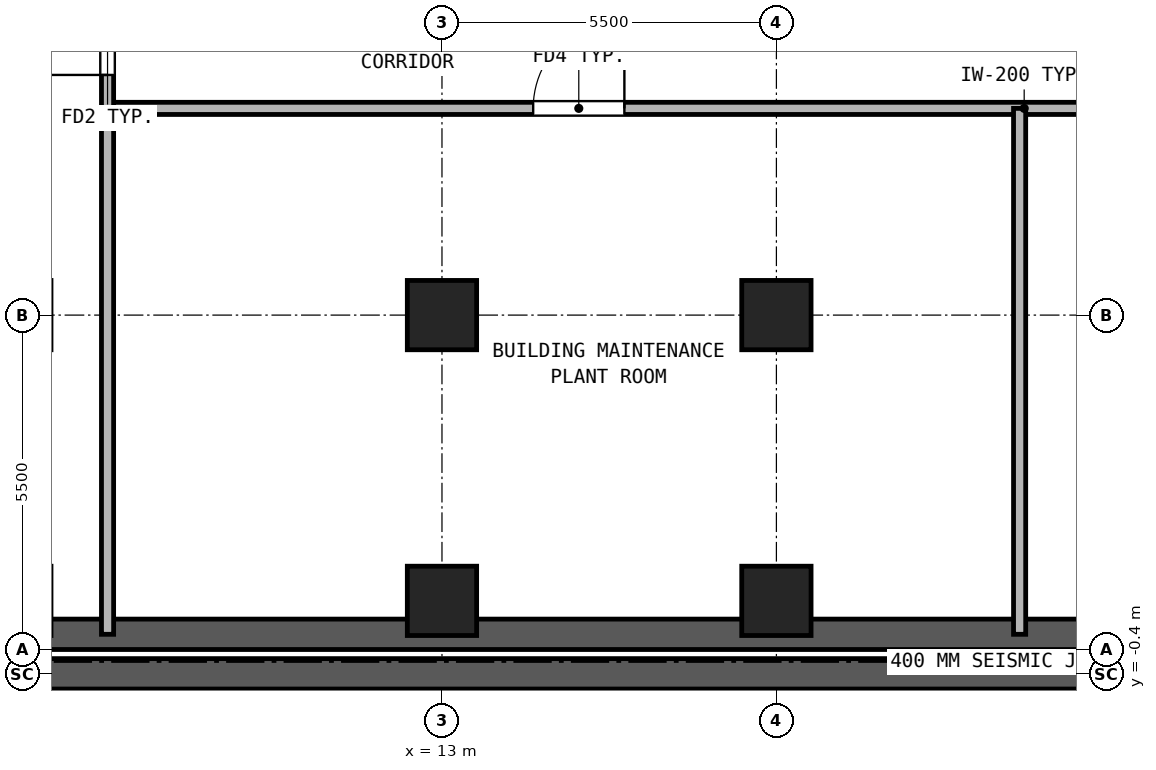
"""IFC4 building model, lengths in metres.
Left out: names, types, materials, properties, quantities, classifications, styles, units other than length and angle.
Written with IfcOpenShell. Run it as: python <this file> out.ifc"""

import sys

from ifc_helpers import new_model, si_unit, direction, frame, frame_2d, origin, origin_2d, place, context, subcontext, project, spatial, rectangle, hollow_rectangle, extrude, source, transform, mapped, element, fill, save


model = new_model("IFC4")
c1 = context("Model", 3, precision=1e-05, world=origin(), true_north=direction((0.0, 1.0)))
c2 = subcontext(c1, "Body", "Model", "MODEL_VIEW")
j1 = project(units=[si_unit("LENGTHUNIT", "METRE"), si_unit("PLANEANGLEUNIT", "RADIAN")], contexts=[c1])
p1 = place(None, origin())
s1 = spatial("IfcSite", under=j1, at=p1, CompositionType="ELEMENT")
p2 = place(p1, origin())
s2 = spatial("IfcBuilding", under=s1, at=p2, CompositionType="ELEMENT")
p3 = place(p2, frame((0.0, 0.0, -4.2)))
s3 = spatial("IfcBuildingStorey", under=s2, at=p3, CompositionType="ELEMENT", Elevation=-4.2)
m1 = source(origin(), c2, "Body", "SweptSolid", [
    extrude(hollow_rectangle(XDim=1.14, YDim=1.14, WallThickness=0.07, at=origin_2d()), origin(), (0.0, 0.0, 1.0), 3.88),
])
for number, where, z_axis, x_axis in (
    (1, (13.0, 0.8, 0.0), (0.0, 0.0, 1.0), (1.0, 0.0, 0.0)),
    (2, (18.5, 0.8, 0.0), (0.0, 0.0, 1.0), (1.0, 0.0, 0.0)),
    (3, (13.0, 5.5, 0.0), (0.0, 0.0, 1.0), (1.0, 0.0, 0.0)),
    (4, (18.5, 5.5, 0.0), (0.0, 0.0, 1.0), (1.0, 0.0, 0.0)),
):
    element("IfcColumn", number, at=place(p3, frame(where, z_axis=z_axis, x_axis=x_axis)), inside=s3, PredefinedType="COLUMN", context=c2, shape_type="MappedRepresentation", body=[
        mapped(m1, transform((0.0, 0.0, 0.0), x_axis=(1.0, 0.0, 0.0), y_axis=(0.0, 1.0, 0.0), z_axis=(0.0, 0.0, 1.0), scale=1.0)),
    ])
p4 = place(p3, frame((4.0, 0.25, 0.0), z_axis=(0.0, 0.0, 1.0), x_axis=(1.0, 0.0, 0.0)))
e5 = element("IfcWall", 5, at=p4, inside=s3, PredefinedType="USERDEFINED", context=c2, shape_type="SweptSolid", body=[
    extrude(rectangle(XDim=39.0, YDim=0.5, at=frame_2d((19.5, 0.0))), origin(), (0.0, 0.0, 1.0), 3.88),
])
p5 = place(p3, frame((47.4, -0.4, 0.0), z_axis=(0.0, 0.0, 1.0), x_axis=(-1.0, 0.0, 0.0)))
e6 = element("IfcWall", 6, at=p5, inside=s3, PredefinedType="USERDEFINED", context=c2, shape_type="SweptSolid", body=[
    extrude(rectangle(XDim=47.4, YDim=0.5, at=frame_2d((23.7, 0.0))), origin(), (0.0, 0.0, 1.0), 3.88),
])
p6 = place(p3, frame((7.5, 8.9, 0.0), z_axis=(0.0, 0.0, 1.0), x_axis=(1.0, 0.0, 0.0)))
e7 = element("IfcWall", 7, at=p6, inside=s3, PredefinedType="PARTITIONING", context=c2, shape_type="SweptSolid", body=[
    extrude(rectangle(XDim=32.0, YDim=0.2, at=frame_2d((16.0, 0.0))), origin(), (0.0, 0.0, 1.0), 3.88),
])
p7 = place(p6, frame((7.0, 0.0, 0.0)))
e8 = element("IfcOpeningElement", 8, at=p7, cuts=e7, PredefinedType="OPENING", context=c2, shape_type="SweptSolid", body=[
    extrude(rectangle(XDim=1.5, YDim=2.25, at=frame_2d((0.75, 1.125))), frame((0.0, 0.11, 0.0), z_axis=(0.0, -1.0, 0.0), x_axis=(1.0, 0.0, 0.0)), (0.0, 0.0, 1.0), 0.22),
])
p8 = place(p6, frame((21.65, 0.0, 0.0)))
e9 = element("IfcOpeningElement", 9, at=p8, cuts=e7, PredefinedType="OPENING", context=c2, shape_type="SweptSolid", body=[
    extrude(rectangle(XDim=1.5, YDim=2.25, at=frame_2d((0.75, 1.125))), frame((0.0, 0.11, 0.0), z_axis=(0.0, -1.0, 0.0), x_axis=(1.0, 0.0, 0.0)), (0.0, 0.0, 1.0), 0.22),
])
p9 = place(p6, frame((30.15, 0.0, 0.0)))
e10 = element("IfcOpeningElement", 10, at=p9, cuts=e7, PredefinedType="OPENING", context=c2, shape_type="SweptSolid", body=[
    extrude(rectangle(XDim=0.92, YDim=2.1, at=frame_2d((0.46, 1.05))), frame((0.0, 0.11, 0.0), z_axis=(0.0, -1.0, 0.0), x_axis=(1.0, 0.0, 0.0)), (0.0, 0.0, 1.0), 0.22),
])
p10 = place(p3, frame((7.5, 0.25, 0.0), z_axis=(0.0, 0.0, 1.0), x_axis=(0.0, 1.0, 0.0)))
e11 = element("IfcWall", 11, at=p10, inside=s3, PredefinedType="PARTITIONING", context=c2, shape_type="SweptSolid", body=[
    extrude(rectangle(XDim=10.75, YDim=0.2, at=frame_2d((5.375, 0.0))), origin(), (0.0, 0.0, 1.0), 3.88),
])
p11 = place(p10, frame((9.2, 0.0, 0.0)))
e12 = element("IfcOpeningElement", 12, at=p11, cuts=e11, PredefinedType="OPENING", context=c2, shape_type="SweptSolid", body=[
    extrude(rectangle(XDim=1.05, YDim=2.15, at=frame_2d((0.525, 1.075))), frame((0.0, 0.11, 0.0), z_axis=(0.0, -1.0, 0.0), x_axis=(1.0, 0.0, 0.0)), (0.0, 0.0, 1.0), 0.22),
])
p12 = place(p3, frame((22.5, 0.25, 0.0), z_axis=(0.0, 0.0, 1.0), x_axis=(0.0, 1.0, 0.0)))
e13 = element("IfcWall", 13, at=p12, inside=s3, PredefinedType="PARTITIONING", context=c2, shape_type="SweptSolid", body=[
    extrude(rectangle(XDim=8.65, YDim=0.2, at=frame_2d((4.325, 0.0))), origin(), (0.0, 0.0, 1.0), 3.88),
])
p13 = place(p7, frame((1.5, 0.0, 0.0), z_axis=(0.0, 0.0, 1.0), x_axis=(-1.0, 0.0, 0.0)))
e14 = element("IfcDoor", 14, at=p13, inside=s3, OperationType="SINGLE_SWING_RIGHT", PredefinedType="DOOR", context=c2, shape_type="SweptSolid", body=[
    extrude(rectangle(XDim=1.5, YDim=2.25, at=frame_2d((0.75, 1.125))), frame((0.0, 0.025, 0.0), z_axis=(0.0, -1.0, 0.0), x_axis=(1.0, 0.0, 0.0)), (0.0, 0.0, 1.0), 0.05),
])
fill(e8, e14)
p14 = place(p11, frame((1.05, 0.0, 0.0), z_axis=(0.0, 0.0, 1.0), x_axis=(-1.0, 0.0, 0.0)))
e15 = element("IfcDoor", 15, at=p14, inside=s3, OperationType="SINGLE_SWING_LEFT", PredefinedType="DOOR", context=c2, shape_type="SweptSolid", body=[
    extrude(rectangle(XDim=1.05, YDim=2.15, at=frame_2d((0.525, 1.075))), frame((0.0, 0.025, 0.0), z_axis=(0.0, -1.0, 0.0), x_axis=(1.0, 0.0, 0.0)), (0.0, 0.0, 1.0), 0.05),
])
fill(e12, e15)
save(model, sys.argv[1])
